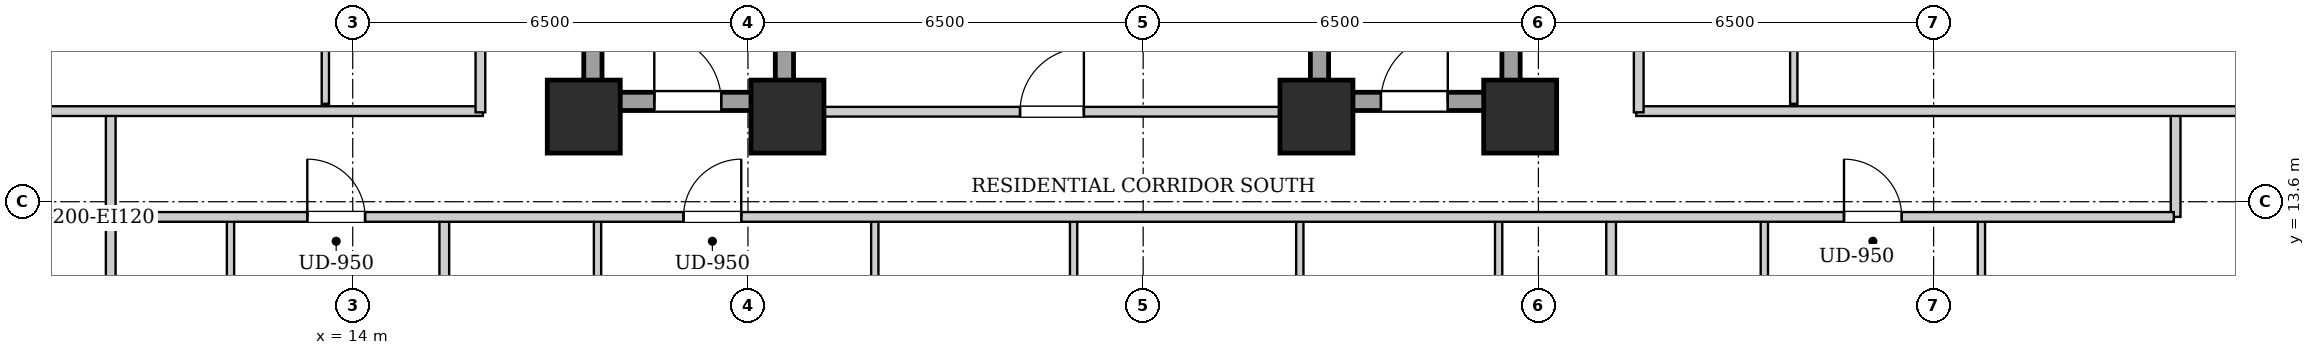
"""IFC4 building model, lengths in metres.
Left out: names, types, materials, properties, quantities, classifications, styles, units other than length and angle.
Written with IfcOpenShell. Run it as: python <this file> out.ifc"""

import sys

from ifc_helpers import new_model, si_unit, direction, frame, frame_2d, origin, origin_2d, place, context, subcontext, project, spatial, rectangle, extrude, element, fill, save


model = new_model("IFC4")
c1 = context("Model", 3, precision=1e-05, world=origin(), true_north=direction((0.0, 1.0)))
c2 = subcontext(c1, "Body", "Model", "MODEL_VIEW")
j1 = project(units=[si_unit("LENGTHUNIT", "METRE"), si_unit("PLANEANGLEUNIT", "RADIAN")], contexts=[c1])
p1 = place(None, origin())
s1 = spatial("IfcSite", under=j1, at=p1, CompositionType="ELEMENT")
p2 = place(p1, origin())
s2 = spatial("IfcBuilding", under=s1, at=p2, CompositionType="ELEMENT")
p3 = place(p2, frame((0.0, 0.0, 51.4)))
s3 = spatial("IfcBuildingStorey", under=s2, at=p3, CompositionType="ELEMENT", Elevation=51.4)
for number, where, z_axis, x_axis in (
    (1, (17.8, 15.0, 0.0), (0.0, 0.0, 1.0), (1.0, 0.0, 0.0)),
    (2, (21.15, 15.0, 0.0), (0.0, 0.0, 1.0), (1.0, 0.0, 0.0)),
    (3, (29.85, 15.0, 0.0), (0.0, 0.0, 1.0), (1.0, 0.0, 0.0)),
    (4, (33.2, 15.0, 0.0), (0.0, 0.0, 1.0), (1.0, 0.0, 0.0)),
):
    element("IfcColumn", number, at=place(p3, frame(where, z_axis=z_axis, x_axis=x_axis)), inside=s3, PredefinedType="COLUMN", context=c2, shape_type="SweptSolid", body=[
        extrude(rectangle(XDim=1.2, YDim=1.2, at=origin_2d()), origin(), (0.0, 0.0, 1.0), 3.2),
    ])
for number, where, z_axis, x_axis in (
    (5, (17.95, 15.1, 0.0), (0.0, 0.0, 1.0), (0.0, 1.0, 0.0)),
    (6, (21.1, 15.1, 0.0), (0.0, 0.0, 1.0), (0.0, 1.0, 0.0)),
):
    element("IfcWall", number, at=place(p3, frame(where, z_axis=z_axis, x_axis=x_axis)), inside=s3, PredefinedType="SHEAR", context=c2, shape_type="SweptSolid", body=[
        extrude(rectangle(XDim=9.0, YDim=0.3, at=frame_2d((4.5, 0.0))), origin(), (0.0, 0.0, 1.0), 2.94),
    ])
p4 = place(p3, frame((18.1, 15.25, 0.0), z_axis=(0.0, 0.0, 1.0), x_axis=(1.0, 0.0, 0.0)))
e7 = element("IfcWall", 7, at=p4, inside=s3, PredefinedType="SHEAR", context=c2, shape_type="SweptSolid", body=[
    extrude(rectangle(XDim=2.85, YDim=0.3, at=frame_2d((1.425, 0.0))), origin(), (0.0, 0.0, 1.0), 2.94),
])
p5 = place(p4, frame((0.86, 0.0, 0.0)))
e8 = element("IfcOpeningElement", 8, at=p5, cuts=e7, PredefinedType="OPENING", context=c2, shape_type="SweptSolid", body=[
    extrude(rectangle(XDim=1.1, YDim=2.05, at=frame_2d((0.55, 1.025))), frame((0.0, 0.16, 0.0), z_axis=(0.0, -1.0, 0.0), x_axis=(1.0, 0.0, 0.0)), (0.0, 0.0, 1.0), 0.32),
])
for number, where, z_axis, x_axis in (
    (9, (29.9, 15.1, 0.0), (0.0, 0.0, 1.0), (0.0, 1.0, 0.0)),
    (10, (33.05, 15.1, 0.0), (0.0, 0.0, 1.0), (0.0, 1.0, 0.0)),
):
    element("IfcWall", number, at=place(p3, frame(where, z_axis=z_axis, x_axis=x_axis)), inside=s3, PredefinedType="SHEAR", context=c2, shape_type="SweptSolid", body=[
        extrude(rectangle(XDim=9.0, YDim=0.3, at=frame_2d((4.5, 0.0))), origin(), (0.0, 0.0, 1.0), 2.94),
    ])
p6 = place(p3, frame((30.05, 15.25, 0.0), z_axis=(0.0, 0.0, 1.0), x_axis=(1.0, 0.0, 0.0)))
e11 = element("IfcWall", 11, at=p6, inside=s3, PredefinedType="SHEAR", context=c2, shape_type="SweptSolid", body=[
    extrude(rectangle(XDim=2.85, YDim=0.3, at=frame_2d((1.425, 0.0))), origin(), (0.0, 0.0, 1.0), 2.94),
])
p7 = place(p6, frame((0.86, 0.0, 0.0)))
e12 = element("IfcOpeningElement", 12, at=p7, cuts=e11, PredefinedType="OPENING", context=c2, shape_type="SweptSolid", body=[
    extrude(rectangle(XDim=1.1, YDim=2.05, at=frame_2d((0.55, 1.025))), frame((0.0, 0.16, 0.0), z_axis=(0.0, -1.0, 0.0), x_axis=(1.0, 0.0, 0.0)), (0.0, 0.0, 1.0), 0.32),
])
p8 = place(p3, frame((21.25, 15.08, 0.0), z_axis=(0.0, 0.0, 1.0), x_axis=(1.0, 0.0, 0.0)))
e13 = element("IfcWall", 13, at=p8, inside=s3, PredefinedType="PARTITIONING", context=c2, shape_type="SweptSolid", body=[
    extrude(rectangle(XDim=8.5, YDim=0.16, at=frame_2d((4.25, 0.0))), origin(), (0.0, 0.0, 1.0), 2.232),
])
p9 = place(p8, frame((3.725, 0.0, 0.0)))
e14 = element("IfcOpeningElement", 14, at=p9, cuts=e13, PredefinedType="OPENING", context=c2, shape_type="SweptSolid", body=[
    extrude(rectangle(XDim=1.05, YDim=2.05, at=frame_2d((0.525, 1.025))), frame((0.0, 0.09, 0.0), z_axis=(0.0, -1.0, 0.0), x_axis=(1.0, 0.0, 0.0)), (0.0, 0.0, 1.0), 0.18),
])
for number, where, z_axis, x_axis in (
    (15, (10.02, 13.35, 0.0), (0.0, 0.0, 1.0), (0.0, 1.0, 0.0)),
    (16, (43.98, 13.35, 0.0), (0.0, 0.0, 1.0), (0.0, 1.0, 0.0)),
):
    element("IfcWall", number, at=place(p3, frame(where, z_axis=z_axis, x_axis=x_axis)), inside=s3, PredefinedType="PARTITIONING", context=c2, shape_type="SweptSolid", body=[
        extrude(rectangle(XDim=1.74, YDim=0.16, at=frame_2d((0.87, 0.0))), origin(), (0.0, 0.0, 1.0), 2.94),
    ])
p10 = place(p3, frame((7.78, 15.09, 0.0), z_axis=(0.0, 0.0, 1.0), x_axis=(1.0, 0.0, 0.0)))
e17 = element("IfcWall", 17, at=p10, inside=s3, PredefinedType="PARTITIONING", context=c2, shape_type="SweptSolid", body=[
    extrude(rectangle(XDim=8.36, YDim=0.16, at=frame_2d((4.18, 0.0))), origin(), (0.0, 0.0, 1.0), 2.232),
])
p11 = place(p3, frame((35.11, 15.09, 0.0), z_axis=(0.0, 0.0, 1.0), x_axis=(1.0, 0.0, 0.0)))
e18 = element("IfcWall", 18, at=p11, inside=s3, PredefinedType="PARTITIONING", context=c2, shape_type="SweptSolid", body=[
    extrude(rectangle(XDim=11.11, YDim=0.16, at=frame_2d((5.555, 0.0))), origin(), (0.0, 0.0, 1.0), 2.232),
])
p12 = place(p3, frame((10.02, 10.4, 0.0), z_axis=(0.0, 0.0, 1.0), x_axis=(0.0, 1.0, 0.0)))
e19 = element("IfcWall", 19, at=p12, inside=s3, PredefinedType="PARTITIONING", context=c2, shape_type="SweptSolid", body=[
    extrude(rectangle(XDim=2.91, YDim=0.16, at=frame_2d((1.455, 0.0))), origin(), (0.0, 0.0, 1.0), 2.94),
])
p13 = place(p3, frame((11.99, 10.46, 0.0), z_axis=(0.0, 0.0, 1.0), x_axis=(0.0, 1.0, 0.0)))
e20 = element("IfcWall", 20, at=p13, inside=s3, PredefinedType="PARTITIONING", context=c2, shape_type="SweptSolid", body=[
    extrude(rectangle(XDim=2.85, YDim=0.12, at=frame_2d((1.425, 0.0))), origin(), (0.0, 0.0, 1.0), 2.94),
])
p14 = place(p13, frame((0.995, 0.0, 0.0)))
e21 = element("IfcOpeningElement", 21, at=p14, cuts=e20, PredefinedType="OPENING", context=c2, shape_type="SweptSolid", body=[
    extrude(rectangle(XDim=0.86, YDim=2.05, at=frame_2d((0.43, 1.025))), frame((0.0, 0.07, 0.0), z_axis=(0.0, -1.0, 0.0), x_axis=(1.0, 0.0, 0.0)), (0.0, 0.0, 1.0), 0.14),
])
p15 = place(p3, frame((15.506, 2.26, 0.0), z_axis=(0.0, 0.0, 1.0), x_axis=(0.0, 1.0, 0.0)))
e22 = element("IfcWall", 22, at=p15, inside=s3, PredefinedType="PARTITIONING", context=c2, shape_type="SweptSolid", body=[
    extrude(rectangle(XDim=11.05, YDim=0.16, at=frame_2d((5.525, 0.0))), origin(), (0.0, 0.0, 1.0), 2.94),
])
p16 = place(p3, frame((18.026, 10.46, 0.0), z_axis=(0.0, 0.0, 1.0), x_axis=(0.0, 1.0, 0.0)))
e23 = element("IfcWall", 23, at=p16, inside=s3, PredefinedType="PARTITIONING", context=c2, shape_type="SweptSolid", body=[
    extrude(rectangle(XDim=2.85, YDim=0.12, at=frame_2d((1.425, 0.0))), origin(), (0.0, 0.0, 1.0), 2.94),
])
p17 = place(p16, frame((0.995, 0.0, 0.0)))
e24 = element("IfcOpeningElement", 24, at=p17, cuts=e23, PredefinedType="OPENING", context=c2, shape_type="SweptSolid", body=[
    extrude(rectangle(XDim=0.86, YDim=2.05, at=frame_2d((0.43, 1.025))), frame((0.0, 0.07, 0.0), z_axis=(0.0, -1.0, 0.0), x_axis=(1.0, 0.0, 0.0)), (0.0, 0.0, 1.0), 0.14),
])
p18 = place(p3, frame((22.586, 10.46, 0.0), z_axis=(0.0, 0.0, 1.0), x_axis=(0.0, 1.0, 0.0)))
e25 = element("IfcWall", 25, at=p18, inside=s3, PredefinedType="PARTITIONING", context=c2, shape_type="SweptSolid", body=[
    extrude(rectangle(XDim=2.85, YDim=0.12, at=frame_2d((1.425, 0.0))), origin(), (0.0, 0.0, 1.0), 2.94),
])
p19 = place(p18, frame((0.975, 0.0, 0.0)))
e26 = element("IfcOpeningElement", 26, at=p19, cuts=e25, PredefinedType="OPENING", context=c2, shape_type="SweptSolid", body=[
    extrude(rectangle(XDim=0.9, YDim=2.05, at=frame_2d((0.45, 1.025))), frame((0.0, 0.07, 0.0), z_axis=(0.0, -1.0, 0.0), x_axis=(1.0, 0.0, 0.0)), (0.0, 0.0, 1.0), 0.14),
])
p20 = place(p3, frame((25.856, 10.46, 0.0), z_axis=(0.0, 0.0, 1.0), x_axis=(0.0, 1.0, 0.0)))
e27 = element("IfcWall", 27, at=p20, inside=s3, PredefinedType="PARTITIONING", context=c2, shape_type="SweptSolid", body=[
    extrude(rectangle(XDim=2.85, YDim=0.12, at=frame_2d((1.425, 0.0))), origin(), (0.0, 0.0, 1.0), 2.94),
])
p21 = place(p20, frame((0.975, 0.0, 0.0)))
e28 = element("IfcOpeningElement", 28, at=p21, cuts=e27, PredefinedType="OPENING", context=c2, shape_type="SweptSolid", body=[
    extrude(rectangle(XDim=0.9, YDim=2.05, at=frame_2d((0.45, 1.025))), frame((0.0, 0.07, 0.0), z_axis=(0.0, -1.0, 0.0), x_axis=(1.0, 0.0, 0.0)), (0.0, 0.0, 1.0), 0.14),
])
p22 = place(p3, frame((29.576, 10.46, 0.0), z_axis=(0.0, 0.0, 1.0), x_axis=(0.0, 1.0, 0.0)))
e29 = element("IfcWall", 29, at=p22, inside=s3, PredefinedType="PARTITIONING", context=c2, shape_type="SweptSolid", body=[
    extrude(rectangle(XDim=2.85, YDim=0.12, at=frame_2d((1.425, 0.0))), origin(), (0.0, 0.0, 1.0), 2.94),
])
p23 = place(p22, frame((0.975, 0.0, 0.0)))
e30 = element("IfcOpeningElement", 30, at=p23, cuts=e29, PredefinedType="OPENING", context=c2, shape_type="SweptSolid", body=[
    extrude(rectangle(XDim=0.9, YDim=2.05, at=frame_2d((0.45, 1.025))), frame((0.0, 0.07, 0.0), z_axis=(0.0, -1.0, 0.0), x_axis=(1.0, 0.0, 0.0)), (0.0, 0.0, 1.0), 0.14),
])
p24 = place(p3, frame((32.846, 10.46, 0.0), z_axis=(0.0, 0.0, 1.0), x_axis=(0.0, 1.0, 0.0)))
e31 = element("IfcWall", 31, at=p24, inside=s3, PredefinedType="PARTITIONING", context=c2, shape_type="SweptSolid", body=[
    extrude(rectangle(XDim=2.85, YDim=0.12, at=frame_2d((1.425, 0.0))), origin(), (0.0, 0.0, 1.0), 2.94),
])
p25 = place(p24, frame((0.975, 0.0, 0.0)))
e32 = element("IfcOpeningElement", 32, at=p25, cuts=e31, PredefinedType="OPENING", context=c2, shape_type="SweptSolid", body=[
    extrude(rectangle(XDim=0.9, YDim=2.05, at=frame_2d((0.45, 1.025))), frame((0.0, 0.07, 0.0), z_axis=(0.0, -1.0, 0.0), x_axis=(1.0, 0.0, 0.0)), (0.0, 0.0, 1.0), 0.14),
])
p26 = place(p3, frame((34.696, 0.28, 0.0), z_axis=(0.0, 0.0, 1.0), x_axis=(0.0, 1.0, 0.0)))
e33 = element("IfcWall", 33, at=p26, inside=s3, PredefinedType="PARTITIONING", context=c2, shape_type="SweptSolid", body=[
    extrude(rectangle(XDim=13.03, YDim=0.16, at=frame_2d((6.515, 0.0))), origin(), (0.0, 0.0, 1.0), 2.94),
])
p27 = place(p3, frame((37.216, 10.46, 0.0), z_axis=(0.0, 0.0, 1.0), x_axis=(0.0, 1.0, 0.0)))
e34 = element("IfcWall", 34, at=p27, inside=s3, PredefinedType="PARTITIONING", context=c2, shape_type="SweptSolid", body=[
    extrude(rectangle(XDim=2.85, YDim=0.12, at=frame_2d((1.425, 0.0))), origin(), (0.0, 0.0, 1.0), 2.94),
])
p28 = place(p27, frame((0.995, 0.0, 0.0)))
e35 = element("IfcOpeningElement", 35, at=p28, cuts=e34, PredefinedType="OPENING", context=c2, shape_type="SweptSolid", body=[
    extrude(rectangle(XDim=0.86, YDim=2.05, at=frame_2d((0.43, 1.025))), frame((0.0, 0.07, 0.0), z_axis=(0.0, -1.0, 0.0), x_axis=(1.0, 0.0, 0.0)), (0.0, 0.0, 1.0), 0.14),
])
p29 = place(p3, frame((40.786, 10.46, 0.0), z_axis=(0.0, 0.0, 1.0), x_axis=(0.0, 1.0, 0.0)))
e36 = element("IfcWall", 36, at=p29, inside=s3, PredefinedType="PARTITIONING", context=c2, shape_type="SweptSolid", body=[
    extrude(rectangle(XDim=2.85, YDim=0.12, at=frame_2d((1.425, 0.0))), origin(), (0.0, 0.0, 1.0), 2.94),
])
p30 = place(p29, frame((0.975, 0.0, 0.0)))
e37 = element("IfcOpeningElement", 37, at=p30, cuts=e36, PredefinedType="OPENING", context=c2, shape_type="SweptSolid", body=[
    extrude(rectangle(XDim=0.9, YDim=2.05, at=frame_2d((0.45, 1.025))), frame((0.0, 0.07, 0.0), z_axis=(0.0, -1.0, 0.0), x_axis=(1.0, 0.0, 0.0)), (0.0, 0.0, 1.0), 0.14),
])
p31 = place(p3, frame((13.55, 15.21, 0.0), z_axis=(0.0, 0.0, 1.0), x_axis=(0.0, 1.0, 0.0)))
e38 = element("IfcWall", 38, at=p31, inside=s3, PredefinedType="PARTITIONING", context=c2, shape_type="SweptSolid", body=[
    extrude(rectangle(XDim=2.3, YDim=0.12, at=frame_2d((1.15, 0.0))), origin(), (0.0, 0.0, 1.0), 2.94),
])
p32 = place(p3, frame((37.7, 15.21, 0.0), z_axis=(0.0, 0.0, 1.0), x_axis=(0.0, 1.0, 0.0)))
e39 = element("IfcWall", 39, at=p32, inside=s3, PredefinedType="PARTITIONING", context=c2, shape_type="SweptSolid", body=[
    extrude(rectangle(XDim=2.159, YDim=0.12, at=frame_2d((1.08, 0.0))), origin(), (0.0, 0.0, 1.0), 2.94),
])
p33 = place(p3, frame((10.05, 13.35, 0.0), z_axis=(0.0, 0.0, 1.0), x_axis=(1.0, 0.0, 0.0)))
e40 = element("IfcWall", 40, at=p33, inside=s3, PredefinedType="PARTITIONING", context=c2, shape_type="SweptSolid", body=[
    extrude(rectangle(XDim=33.9, YDim=0.16, at=frame_2d((16.95, 0.0))), origin(), (0.0, 0.0, 1.0), 2.94),
])
p34 = place(p33, frame((3.203, 0.0, 0.0)))
e41 = element("IfcOpeningElement", 41, at=p34, cuts=e40, PredefinedType="OPENING", context=c2, shape_type="SweptSolid", body=[
    extrude(rectangle(XDim=0.95, YDim=2.1, at=frame_2d((0.475, 1.05))), frame((0.0, 0.09, 0.0), z_axis=(0.0, -1.0, 0.0), x_axis=(1.0, 0.0, 0.0)), (0.0, 0.0, 1.0), 0.18),
])
p35 = place(p33, frame((9.39, 0.0, 0.0)))
e42 = element("IfcOpeningElement", 42, at=p35, cuts=e40, PredefinedType="OPENING", context=c2, shape_type="SweptSolid", body=[
    extrude(rectangle(XDim=0.95, YDim=2.1, at=frame_2d((0.475, 1.05))), frame((0.0, 0.09, 0.0), z_axis=(0.0, -1.0, 0.0), x_axis=(1.0, 0.0, 0.0)), (0.0, 0.0, 1.0), 0.18),
])
p36 = place(p33, frame((28.476, 0.0, 0.0)))
e43 = element("IfcOpeningElement", 43, at=p36, cuts=e40, PredefinedType="OPENING", context=c2, shape_type="SweptSolid", body=[
    extrude(rectangle(XDim=0.95, YDim=2.1, at=frame_2d((0.475, 1.05))), frame((0.0, 0.09, 0.0), z_axis=(0.0, -1.0, 0.0), x_axis=(1.0, 0.0, 0.0)), (0.0, 0.0, 1.0), 0.18),
])
p37 = place(p3, frame((16.1, 15.07, 0.0), z_axis=(0.0, 0.0, 1.0), x_axis=(0.0, 1.0, 0.0)))
e44 = element("IfcWall", 44, at=p37, inside=s3, PredefinedType="PARTITIONING", context=c2, shape_type="SweptSolid", body=[
    extrude(rectangle(XDim=13.93, YDim=0.16, at=frame_2d((6.965, 0.0))), origin(), (0.0, 0.0, 1.0), 2.94),
])
p38 = place(p37, frame((4.385, 0.0, 0.0)))
e45 = element("IfcOpeningElement", 45, at=p38, cuts=e44, PredefinedType="OPENING", context=c2, shape_type="SweptSolid", body=[
    extrude(rectangle(XDim=0.95, YDim=2.1, at=frame_2d((0.475, 1.05))), frame((0.0, 0.09, 0.0), z_axis=(0.0, -1.0, 0.0), x_axis=(1.0, 0.0, 0.0)), (0.0, 0.0, 1.0), 0.18),
])
p39 = place(p3, frame((35.15, 15.07, 0.0), z_axis=(0.0, 0.0, 1.0), x_axis=(0.0, 1.0, 0.0)))
e46 = element("IfcWall", 46, at=p39, inside=s3, PredefinedType="PARTITIONING", context=c2, shape_type="SweptSolid", body=[
    extrude(rectangle(XDim=13.93, YDim=0.16, at=frame_2d((6.965, 0.0))), origin(), (0.0, 0.0, 1.0), 2.94),
])
p40 = place(p39, frame((4.661, 0.0, 0.0)))
e47 = element("IfcOpeningElement", 47, at=p40, cuts=e46, PredefinedType="OPENING", context=c2, shape_type="SweptSolid", body=[
    extrude(rectangle(XDim=0.95, YDim=2.1, at=frame_2d((0.475, 1.05))), frame((0.0, 0.09, 0.0), z_axis=(0.0, -1.0, 0.0), x_axis=(1.0, 0.0, 0.0)), (0.0, 0.0, 1.0), 0.18),
])
p41 = place(p39, frame((11.411, 0.0, 0.0)))
e48 = element("IfcOpeningElement", 48, at=p41, cuts=e46, PredefinedType="OPENING", context=c2, shape_type="SweptSolid", body=[
    extrude(rectangle(XDim=0.95, YDim=2.1, at=frame_2d((0.475, 1.05))), frame((0.0, 0.09, 0.0), z_axis=(0.0, -1.0, 0.0), x_axis=(1.0, 0.0, 0.0)), (0.0, 0.0, 1.0), 0.18),
])
p42 = place(p5, origin())
e49 = element("IfcDoor", 49, at=p42, inside=s3, OperationType="SINGLE_SWING_LEFT", PredefinedType="DOOR", context=c2, shape_type="SweptSolid", body=[
    extrude(rectangle(XDim=1.1, YDim=2.05, at=frame_2d((0.55, 1.025))), frame((0.0, 0.025, 0.0), z_axis=(0.0, -1.0, 0.0), x_axis=(1.0, 0.0, 0.0)), (0.0, 0.0, 1.0), 0.05),
])
fill(e8, e49)
p43 = place(p7, origin())
e50 = element("IfcDoor", 50, at=p43, inside=s3, OperationType="SINGLE_SWING_RIGHT", PredefinedType="DOOR", context=c2, shape_type="SweptSolid", body=[
    extrude(rectangle(XDim=1.1, YDim=2.05, at=frame_2d((0.55, 1.025))), frame((0.0, 0.025, 0.0), z_axis=(0.0, -1.0, 0.0), x_axis=(1.0, 0.0, 0.0)), (0.0, 0.0, 1.0), 0.05),
])
fill(e12, e50)
p44 = place(p9, origin())
e51 = element("IfcDoor", 51, at=p44, inside=s3, OperationType="SINGLE_SWING_RIGHT", PredefinedType="DOOR", context=c2, shape_type="SweptSolid", body=[
    extrude(rectangle(XDim=1.05, YDim=2.05, at=frame_2d((0.525, 1.025))), frame((0.0, 0.025, 0.0), z_axis=(0.0, -1.0, 0.0), x_axis=(1.0, 0.0, 0.0)), (0.0, 0.0, 1.0), 0.05),
])
fill(e14, e51)
p45 = place(p34, origin())
e52 = element("IfcDoor", 52, at=p45, inside=s3, OperationType="SINGLE_SWING_LEFT", PredefinedType="DOOR", context=c2, shape_type="SweptSolid", body=[
    extrude(rectangle(XDim=0.95, YDim=2.1, at=frame_2d((0.475, 1.05))), frame((0.0, 0.025, 0.0), z_axis=(0.0, -1.0, 0.0), x_axis=(1.0, 0.0, 0.0)), (0.0, 0.0, 1.0), 0.05),
])
fill(e41, e52)
p46 = place(p35, origin())
e53 = element("IfcDoor", 53, at=p46, inside=s3, OperationType="SINGLE_SWING_RIGHT", PredefinedType="DOOR", context=c2, shape_type="SweptSolid", body=[
    extrude(rectangle(XDim=0.95, YDim=2.1, at=frame_2d((0.475, 1.05))), frame((0.0, 0.025, 0.0), z_axis=(0.0, -1.0, 0.0), x_axis=(1.0, 0.0, 0.0)), (0.0, 0.0, 1.0), 0.05),
])
fill(e42, e53)
p47 = place(p36, origin())
e54 = element("IfcDoor", 54, at=p47, inside=s3, OperationType="SINGLE_SWING_LEFT", PredefinedType="DOOR", context=c2, shape_type="SweptSolid", body=[
    extrude(rectangle(XDim=0.95, YDim=2.1, at=frame_2d((0.475, 1.05))), frame((0.0, 0.025, 0.0), z_axis=(0.0, -1.0, 0.0), x_axis=(1.0, 0.0, 0.0)), (0.0, 0.0, 1.0), 0.05),
])
fill(e43, e54)
save(model, sys.argv[1])
